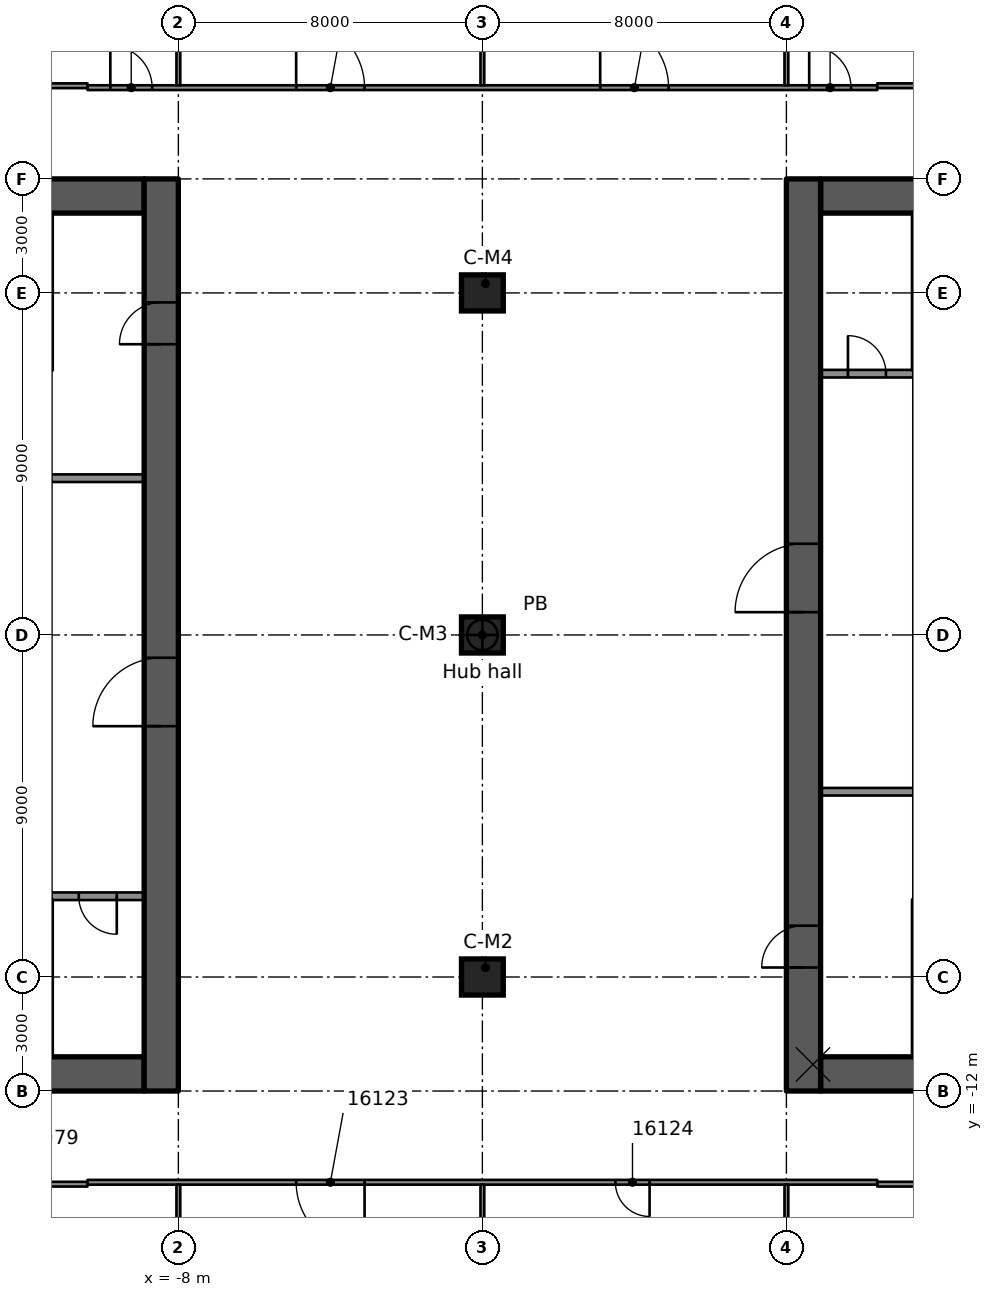
"""IFC4 building model, lengths in metres.
Left out: names, types, materials, properties, quantities, classifications, styles, units other than length and angle.
Written with IfcOpenShell. Run it as: python <this file> out.ifc"""

import sys

from ifc_helpers import new_model, si_unit, direction, frame, frame_2d, origin, origin_2d, place, context, subcontext, project, spatial, rectangle, extrude, element, fill, save


model = new_model("IFC4")
c1 = context("Model", 3, precision=1e-05, world=origin(), true_north=direction((0.0, 1.0)))
c2 = subcontext(c1, "Body", "Model", "MODEL_VIEW")
j1 = project(units=[si_unit("LENGTHUNIT", "METRE"), si_unit("PLANEANGLEUNIT", "RADIAN")], contexts=[c1])
p1 = place(None, origin())
s1 = spatial("IfcSite", under=j1, at=p1, CompositionType="ELEMENT")
p2 = place(p1, origin())
s2 = spatial("IfcBuilding", under=s1, at=p2, CompositionType="ELEMENT")
p3 = place(p2, frame((0.0, 0.0, 80.7)))
s3 = spatial("IfcBuildingStorey", under=s2, at=p3, CompositionType="ELEMENT", Elevation=80.7)
p4 = place(p3, frame((-18.1, 11.55, 0.0), z_axis=(0.0, 0.0, 1.0), x_axis=(1.0, 0.0, 0.0)))
e1 = element("IfcWall", 1, at=p4, inside=s3, PredefinedType="SHEAR", context=c2, shape_type="SweptSolid", body=[
    extrude(rectangle(XDim=9.2, YDim=0.9, at=frame_2d((4.6, 0.0))), origin(), (0.0, 0.0, 1.0), 3.5),
])
p5 = place(p4, frame((5.1, 0.0, 0.0)))
e2 = element("IfcOpeningElement", 2, at=p5, cuts=e1, PredefinedType="OPENING", context=c2, shape_type="SweptSolid", body=[
    extrude(rectangle(XDim=1.1, YDim=2.1, at=frame_2d((0.55, 1.05))), frame((0.0, 0.46, 0.0), z_axis=(0.0, -1.0, 0.0), x_axis=(1.0, 0.0, 0.0)), (0.0, 0.0, 1.0), 0.92),
])
p6 = place(p3, frame((-18.1, -11.55, 0.0), z_axis=(0.0, 0.0, 1.0), x_axis=(1.0, 0.0, 0.0)))
e3 = element("IfcWall", 3, at=p6, inside=s3, PredefinedType="SHEAR", context=c2, shape_type="SweptSolid", body=[
    extrude(rectangle(XDim=9.2, YDim=0.9, at=frame_2d((4.6, 0.0))), origin(), (0.0, 0.0, 1.0), 3.5),
])
p7 = place(p6, frame((5.1, 0.0, 0.0)))
e4 = element("IfcOpeningElement", 4, at=p7, cuts=e3, PredefinedType="OPENING", context=c2, shape_type="SweptSolid", body=[
    extrude(rectangle(XDim=1.1, YDim=2.1, at=frame_2d((0.55, 1.05))), frame((0.0, 0.46, 0.0), z_axis=(0.0, -1.0, 0.0), x_axis=(1.0, 0.0, 0.0)), (0.0, 0.0, 1.0), 0.92),
])
p8 = place(p3, frame((-8.45, -12.0, 0.0), z_axis=(0.0, 0.0, 1.0), x_axis=(0.0, 1.0, 0.0)))
e5 = element("IfcWall", 5, at=p8, inside=s3, PredefinedType="SHEAR", context=c2, shape_type="SweptSolid", body=[
    extrude(rectangle(XDim=24.0, YDim=0.9, at=frame_2d((12.0, 0.0))), origin(), (0.0, 0.0, 1.0), 3.5),
])
p9 = place(p8, frame((9.6, 0.0, 0.0)))
e6 = element("IfcOpeningElement", 6, at=p9, cuts=e5, PredefinedType="OPENING", context=c2, shape_type="SweptSolid", body=[
    extrude(rectangle(XDim=1.8, YDim=2.1, at=frame_2d((0.9, 1.05))), frame((0.0, 0.46, 0.0), z_axis=(0.0, -1.0, 0.0), x_axis=(1.0, 0.0, 0.0)), (0.0, 0.0, 1.0), 0.92),
])
p10 = place(p8, frame((19.65, 0.0, 0.0)))
e7 = element("IfcOpeningElement", 7, at=p10, cuts=e5, PredefinedType="OPENING", context=c2, shape_type="SweptSolid", body=[
    extrude(rectangle(XDim=1.1, YDim=2.1, at=frame_2d((0.55, 1.05))), frame((0.0, 0.46, 0.0), z_axis=(0.0, -1.0, 0.0), x_axis=(1.0, 0.0, 0.0)), (0.0, 0.0, 1.0), 0.92),
])
p11 = place(p3, frame((8.9, 11.55, 0.0), z_axis=(0.0, 0.0, 1.0), x_axis=(1.0, 0.0, 0.0)))
e8 = element("IfcWall", 8, at=p11, inside=s3, PredefinedType="SHEAR", context=c2, shape_type="SweptSolid", body=[
    extrude(rectangle(XDim=9.2, YDim=0.9, at=frame_2d((4.6, 0.0))), origin(), (0.0, 0.0, 1.0), 3.5),
])
p12 = place(p11, frame((3.0, 0.0, 0.0)))
e9 = element("IfcOpeningElement", 9, at=p12, cuts=e8, PredefinedType="OPENING", context=c2, shape_type="SweptSolid", body=[
    extrude(rectangle(XDim=1.1, YDim=2.1, at=frame_2d((0.55, 1.05))), frame((0.0, 0.46, 0.0), z_axis=(0.0, -1.0, 0.0), x_axis=(1.0, 0.0, 0.0)), (0.0, 0.0, 1.0), 0.92),
])
p13 = place(p3, frame((8.9, -11.55, 0.0), z_axis=(0.0, 0.0, 1.0), x_axis=(1.0, 0.0, 0.0)))
e10 = element("IfcWall", 10, at=p13, inside=s3, PredefinedType="SHEAR", context=c2, shape_type="SweptSolid", body=[
    extrude(rectangle(XDim=9.2, YDim=0.9, at=frame_2d((4.6, 0.0))), origin(), (0.0, 0.0, 1.0), 3.5),
])
p14 = place(p13, frame((3.0, 0.0, 0.0)))
e11 = element("IfcOpeningElement", 11, at=p14, cuts=e10, PredefinedType="OPENING", context=c2, shape_type="SweptSolid", body=[
    extrude(rectangle(XDim=1.1, YDim=2.1, at=frame_2d((0.55, 1.05))), frame((0.0, 0.46, 0.0), z_axis=(0.0, -1.0, 0.0), x_axis=(1.0, 0.0, 0.0)), (0.0, 0.0, 1.0), 0.92),
])
p15 = place(p3, frame((8.45, -12.0, 0.0), z_axis=(0.0, 0.0, 1.0), x_axis=(0.0, 1.0, 0.0)))
e12 = element("IfcWall", 12, at=p15, inside=s3, PredefinedType="SHEAR", context=c2, shape_type="SweptSolid", body=[
    extrude(rectangle(XDim=24.0, YDim=0.9, at=frame_2d((12.0, 0.0))), origin(), (0.0, 0.0, 1.0), 3.5),
])
p16 = place(p15, frame((12.6, 0.0, 0.0)))
e13 = element("IfcOpeningElement", 13, at=p16, cuts=e12, PredefinedType="OPENING", context=c2, shape_type="SweptSolid", body=[
    extrude(rectangle(XDim=1.8, YDim=2.1, at=frame_2d((0.9, 1.05))), frame((0.0, 0.46, 0.0), z_axis=(0.0, -1.0, 0.0), x_axis=(1.0, 0.0, 0.0)), (0.0, 0.0, 1.0), 0.92),
])
p17 = place(p15, frame((3.25, 0.0, 0.0)))
e14 = element("IfcOpeningElement", 14, at=p17, cuts=e12, PredefinedType="OPENING", context=c2, shape_type="SweptSolid", body=[
    extrude(rectangle(XDim=1.1, YDim=2.1, at=frame_2d((0.55, 1.05))), frame((0.0, 0.46, 0.0), z_axis=(0.0, -1.0, 0.0), x_axis=(1.0, 0.0, 0.0)), (0.0, 0.0, 1.0), 0.92),
])
for number, where, z_axis, x_axis in (
    (15, (0.0, -9.0, 0.0), (0.0, 0.0, 1.0), (1.0, 0.0, 0.0)),
    (16, (0.0, 0.0, 0.0), (0.0, 0.0, 1.0), (1.0, 0.0, 0.0)),
    (17, (0.0, 9.0, 0.0), (0.0, 0.0, 1.0), (1.0, 0.0, 0.0)),
):
    element("IfcColumn", number, at=place(p3, frame(where, z_axis=z_axis, x_axis=x_axis)), inside=s3, PredefinedType="COLUMN", context=c2, shape_type="SweptSolid", body=[
        extrude(rectangle(XDim=1.1, YDim=0.95, at=origin_2d()), origin(), (0.0, 0.0, 1.0), 3.5),
    ])
p18 = place(p3, frame((-8.9, 4.125, 0.0), z_axis=(0.0, 0.0, 1.0), x_axis=(-1.0, 0.0, 0.0)))
e18 = element("IfcWall", 18, at=p18, inside=s3, PredefinedType="PARTITIONING", context=c2, shape_type="SweptSolid", body=[
    extrude(rectangle(XDim=2.44, YDim=0.2, at=frame_2d((1.22, 0.0))), origin(), (0.0, 0.0, 1.0), 3.09),
])
p19 = place(p3, frame((-8.9, -6.875, 0.0), z_axis=(0.0, 0.0, 1.0), x_axis=(-1.0, 0.0, 0.0)))
e19 = element("IfcWall", 19, at=p19, inside=s3, PredefinedType="PARTITIONING", context=c2, shape_type="SweptSolid", body=[
    extrude(rectangle(XDim=2.44, YDim=0.2, at=frame_2d((1.22, 0.0))), origin(), (0.0, 0.0, 1.0), 3.09),
])
p20 = place(p19, frame((0.72, 0.0, 0.0)))
e20 = element("IfcOpeningElement", 20, at=p20, cuts=e19, PredefinedType="OPENING", context=c2, shape_type="SweptSolid", body=[
    extrude(rectangle(XDim=1.0, YDim=2.1, at=frame_2d((0.5, 1.05))), frame((0.0, 0.11, 0.0), z_axis=(0.0, -1.0, 0.0), x_axis=(1.0, 0.0, 0.0)), (0.0, 0.0, 1.0), 0.22),
])
p21 = place(p3, frame((8.9, -4.125, 0.0), z_axis=(0.0, 0.0, 1.0), x_axis=(1.0, 0.0, 0.0)))
e21 = element("IfcWall", 21, at=p21, inside=s3, PredefinedType="PARTITIONING", context=c2, shape_type="SweptSolid", body=[
    extrude(rectangle(XDim=2.44, YDim=0.2, at=frame_2d((1.22, 0.0))), origin(), (0.0, 0.0, 1.0), 3.09),
])
p22 = place(p3, frame((8.9, 6.875, 0.0), z_axis=(0.0, 0.0, 1.0), x_axis=(1.0, 0.0, 0.0)))
e22 = element("IfcWall", 22, at=p22, inside=s3, PredefinedType="PARTITIONING", context=c2, shape_type="SweptSolid", body=[
    extrude(rectangle(XDim=2.44, YDim=0.2, at=frame_2d((1.22, 0.0))), origin(), (0.0, 0.0, 1.0), 3.09),
])
p23 = place(p22, frame((0.72, 0.0, 0.0)))
e23 = element("IfcOpeningElement", 23, at=p23, cuts=e22, PredefinedType="OPENING", context=c2, shape_type="SweptSolid", body=[
    extrude(rectangle(XDim=1.0, YDim=2.1, at=frame_2d((0.5, 1.05))), frame((0.0, 0.11, 0.0), z_axis=(0.0, -1.0, 0.0), x_axis=(1.0, 0.0, 0.0)), (0.0, 0.0, 1.0), 0.22),
])
p24 = place(p3, frame((-11.543, -14.513, 0.0), z_axis=(0.0, 0.0, 1.0), x_axis=(0.055968733348, -0.99843252195, 0.0)))
e24 = element("IfcWall", 24, at=p24, inside=s3, PredefinedType="PARTITIONING", context=c2, shape_type="SweptSolid", body=[
    extrude(rectangle(XDim=3.145, YDim=0.125, at=frame_2d((1.573, 0.0))), origin(), (0.0, 0.0, 1.0), 3.08),
])
p25 = place(p24, frame((1.038, 0.0, 0.0)))
e25 = element("IfcOpeningElement", 25, at=p25, cuts=e24, PredefinedType="OPENING", context=c2, shape_type="SweptSolid", body=[
    extrude(rectangle(XDim=0.9, YDim=2.1, at=frame_2d((0.45, 1.05))), frame((0.0, 0.073, 0.0), z_axis=(0.0, -1.0, 0.0), x_axis=(1.0, 0.0, 0.0)), (0.0, 0.0, 1.0), 0.145),
])
p26 = place(p3, frame((-11.546, -14.451, 0.0), z_axis=(0.0, 0.0, 1.0), x_axis=(1.0, 0.0, 0.0)))
e26 = element("IfcWall", 26, at=p26, inside=s3, PredefinedType="PARTITIONING", context=c2, shape_type="SweptSolid", body=[
    extrude(rectangle(XDim=1.155, YDim=0.125, at=frame_2d((0.577, 0.0))), origin(), (0.0, 0.0, 1.0), 3.08),
])
p27 = place(p3, frame((21.378, -14.451, 0.0), z_axis=(0.0, 0.0, 1.0), x_axis=(-1.0, 0.0, 0.0)))
e27 = element("IfcWall", 27, at=p27, inside=s3, PredefinedType="PARTITIONING", context=c2, shape_type="SweptSolid", body=[
    extrude(rectangle(XDim=10.987, YDim=0.125, at=frame_2d((5.493, 0.0))), origin(), (0.0, 0.0, 1.0), 3.08),
])
p28 = place(p27, frame((7.811, 0.0, 0.0)))
e28 = element("IfcOpeningElement", 28, at=p28, cuts=e27, PredefinedType="OPENING", context=c2, shape_type="SweptSolid", body=[
    extrude(rectangle(XDim=0.9, YDim=2.1, at=frame_2d((0.45, 1.05))), frame((0.0, 0.073, 0.0), z_axis=(0.0, -1.0, 0.0), x_axis=(1.0, 0.0, 0.0)), (0.0, 0.0, 1.0), 0.145),
])
p29 = place(p27, frame((2.288, 0.0, 0.0)))
e29 = element("IfcOpeningElement", 29, at=p29, cuts=e27, PredefinedType="OPENING", context=c2, shape_type="SweptSolid", body=[
    extrude(rectangle(XDim=0.9, YDim=2.1, at=frame_2d((0.45, 1.05))), frame((0.0, 0.073, 0.0), z_axis=(0.0, -1.0, 0.0), x_axis=(1.0, 0.0, 0.0)), (0.0, 0.0, 1.0), 0.145),
])
p30 = place(p3, frame((10.391, -14.401, 0.0), z_axis=(0.0, 0.0, 1.0), x_axis=(-1.0, 0.0, 0.0)))
e30 = element("IfcWall", 30, at=p30, inside=s3, PredefinedType="PARTITIONING", context=c2, shape_type="SweptSolid", body=[
    extrude(rectangle(XDim=20.781, YDim=0.125, at=frame_2d((10.391, 0.0))), origin(), (0.0, 0.0, 1.0), 3.08),
])
p31 = place(p30, frame((13.491, 0.0, 0.0)))
e31 = element("IfcOpeningElement", 31, at=p31, cuts=e30, PredefinedType="OPENING", context=c2, shape_type="SweptSolid", body=[
    extrude(rectangle(XDim=1.8, YDim=2.1, at=frame_2d((0.9, 1.05))), frame((0.0, 0.073, 0.0), z_axis=(0.0, -1.0, 0.0), x_axis=(1.0, 0.0, 0.0)), (0.0, 0.0, 1.0), 0.145),
])
p32 = place(p30, frame((5.991, 0.0, 0.0)))
e32 = element("IfcOpeningElement", 32, at=p32, cuts=e30, PredefinedType="OPENING", context=c2, shape_type="SweptSolid", body=[
    extrude(rectangle(XDim=0.9, YDim=2.1, at=frame_2d((0.45, 1.05))), frame((0.0, 0.073, 0.0), z_axis=(0.0, -1.0, 0.0), x_axis=(1.0, 0.0, 0.0)), (0.0, 0.0, 1.0), 0.145),
])
p33 = place(p3, frame((-10.39, 14.401, 0.0), z_axis=(0.0, 0.0, 1.0), x_axis=(1.0, 0.0, 0.0)))
e33 = element("IfcWall", 33, at=p33, inside=s3, PredefinedType="PARTITIONING", context=c2, shape_type="SweptSolid", body=[
    extrude(rectangle(XDim=20.781, YDim=0.125, at=frame_2d((10.391, 0.0))), origin(), (0.0, 0.0, 1.0), 3.08),
])
p34 = place(p33, frame((18.99, 0.0, 0.0)))
e34 = element("IfcOpeningElement", 34, at=p34, cuts=e33, PredefinedType="OPENING", context=c2, shape_type="SweptSolid", body=[
    extrude(rectangle(XDim=1.1, YDim=2.1, at=frame_2d((0.55, 1.05))), frame((0.0, 0.073, 0.0), z_axis=(0.0, -1.0, 0.0), x_axis=(1.0, 0.0, 0.0)), (0.0, 0.0, 1.0), 0.145),
])
p35 = place(p33, frame((13.49, 0.0, 0.0)))
e35 = element("IfcOpeningElement", 35, at=p35, cuts=e33, PredefinedType="OPENING", context=c2, shape_type="SweptSolid", body=[
    extrude(rectangle(XDim=1.8, YDim=2.1, at=frame_2d((0.9, 1.05))), frame((0.0, 0.073, 0.0), z_axis=(0.0, -1.0, 0.0), x_axis=(1.0, 0.0, 0.0)), (0.0, 0.0, 1.0), 0.145),
])
p36 = place(p33, frame((5.49, 0.0, 0.0)))
e36 = element("IfcOpeningElement", 36, at=p36, cuts=e33, PredefinedType="OPENING", context=c2, shape_type="SweptSolid", body=[
    extrude(rectangle(XDim=1.8, YDim=2.1, at=frame_2d((0.9, 1.05))), frame((0.0, 0.073, 0.0), z_axis=(0.0, -1.0, 0.0), x_axis=(1.0, 0.0, 0.0)), (0.0, 0.0, 1.0), 0.145),
])
p37 = place(p33, frame((0.6, 0.0, 0.0)))
e37 = element("IfcOpeningElement", 37, at=p37, cuts=e33, PredefinedType="OPENING", context=c2, shape_type="SweptSolid", body=[
    extrude(rectangle(XDim=1.1, YDim=2.1, at=frame_2d((0.55, 1.05))), frame((0.0, 0.073, 0.0), z_axis=(0.0, -1.0, 0.0), x_axis=(1.0, 0.0, 0.0)), (0.0, 0.0, 1.0), 0.145),
])
p38 = place(p3, frame((-21.387, 14.451, 0.0), z_axis=(0.0, 0.0, 1.0), x_axis=(1.0, 0.0, 0.0)))
e38 = element("IfcWall", 38, at=p38, inside=s3, PredefinedType="PARTITIONING", context=c2, shape_type="SweptSolid", body=[
    extrude(rectangle(XDim=10.996, YDim=0.125, at=frame_2d((5.498, 0.0))), origin(), (0.0, 0.0, 1.0), 3.08),
])
p39 = place(p38, frame((2.288, 0.0, 0.0)))
e39 = element("IfcOpeningElement", 39, at=p39, cuts=e38, PredefinedType="OPENING", context=c2, shape_type="SweptSolid", body=[
    extrude(rectangle(XDim=0.9, YDim=2.1, at=frame_2d((0.45, 1.05))), frame((0.0, 0.073, 0.0), z_axis=(0.0, -1.0, 0.0), x_axis=(1.0, 0.0, 0.0)), (0.0, 0.0, 1.0), 0.145),
])
p40 = place(p3, frame((10.391, 14.451, 0.0), z_axis=(0.0, 0.0, 1.0), x_axis=(1.0, 0.0, 0.0)))
e40 = element("IfcWall", 40, at=p40, inside=s3, PredefinedType="PARTITIONING", context=c2, shape_type="SweptSolid", body=[
    extrude(rectangle(XDim=10.996, YDim=0.125, at=frame_2d((5.498, 0.0))), origin(), (0.0, 0.0, 1.0), 3.08),
])
p41 = place(p3, frame((8.0, -29.186, 0.0), z_axis=(0.0, 0.0, 1.0), x_axis=(0.0, 1.0, 0.0)))
e41 = element("IfcWall", 41, at=p41, inside=s3, PredefinedType="PARTITIONING", context=c2, shape_type="SweptSolid", body=[
    extrude(rectangle(XDim=14.723, YDim=0.1, at=frame_2d((7.362, 0.0))), origin(), (0.0, 0.0, 1.0), 3.08),
])
p42 = place(p3, frame((8.0, 14.463, 0.0), z_axis=(0.0, 0.0, 1.0), x_axis=(0.0, 1.0, 0.0)))
e42 = element("IfcWall", 42, at=p42, inside=s3, PredefinedType="PARTITIONING", context=c2, shape_type="SweptSolid", body=[
    extrude(rectangle(XDim=15.543, YDim=0.1, at=frame_2d((7.771, 0.0))), origin(), (0.0, 0.0, 1.0), 3.08),
])
p43 = place(p3, frame((0.0, -34.871, 0.0), z_axis=(0.0, 0.0, 1.0), x_axis=(0.0, 1.0, 0.0)))
e43 = element("IfcWall", 43, at=p43, inside=s3, PredefinedType="PARTITIONING", context=c2, shape_type="SweptSolid", body=[
    extrude(rectangle(XDim=20.408, YDim=0.1, at=frame_2d((10.204, 0.0))), origin(), (0.0, 0.0, 1.0), 3.08),
])
p44 = place(p3, frame((0.0, 14.463, 0.0), z_axis=(0.0, 0.0, 1.0), x_axis=(0.0, 1.0, 0.0)))
e44 = element("IfcWall", 44, at=p44, inside=s3, PredefinedType="PARTITIONING", context=c2, shape_type="SweptSolid", body=[
    extrude(rectangle(XDim=17.169, YDim=0.1, at=frame_2d((8.584, 0.0))), origin(), (0.0, 0.0, 1.0), 3.08),
])
p45 = place(p3, frame((-8.0, -33.126, 0.0), z_axis=(0.0, 0.0, 1.0), x_axis=(0.0, 1.0, 0.0)))
e45 = element("IfcWall", 45, at=p45, inside=s3, PredefinedType="PARTITIONING", context=c2, shape_type="SweptSolid", body=[
    extrude(rectangle(XDim=18.663, YDim=0.1, at=frame_2d((9.332, 0.0))), origin(), (0.0, 0.0, 1.0), 3.08),
])
p46 = place(p3, frame((-8.0, 14.463, 0.0), z_axis=(0.0, 0.0, 1.0), x_axis=(0.0, 1.0, 0.0)))
e46 = element("IfcWall", 46, at=p46, inside=s3, PredefinedType="PARTITIONING", context=c2, shape_type="SweptSolid", body=[
    extrude(rectangle(XDim=14.723, YDim=0.1, at=frame_2d((7.362, 0.0))), origin(), (0.0, 0.0, 1.0), 3.08),
])
p47 = place(p9, origin())
e47 = element("IfcDoor", 47, at=p47, inside=s3, OperationType="SINGLE_SWING_LEFT", PredefinedType="DOOR", context=c2, shape_type="SweptSolid", body=[
    extrude(rectangle(XDim=1.8, YDim=2.1, at=frame_2d((0.9, 1.05))), frame((0.0, 0.025, 0.0), z_axis=(0.0, -1.0, 0.0), x_axis=(1.0, 0.0, 0.0)), (0.0, 0.0, 1.0), 0.05),
])
fill(e6, e47)
p48 = place(p10, origin())
e48 = element("IfcDoor", 48, at=p48, inside=s3, OperationType="SINGLE_SWING_RIGHT", PredefinedType="DOOR", context=c2, shape_type="SweptSolid", body=[
    extrude(rectangle(XDim=1.1, YDim=2.1, at=frame_2d((0.55, 1.05))), frame((0.0, 0.025, 0.0), z_axis=(0.0, -1.0, 0.0), x_axis=(1.0, 0.0, 0.0)), (0.0, 0.0, 1.0), 0.05),
])
fill(e7, e48)
p49 = place(p20, origin())
e49 = element("IfcDoor", 49, at=p49, inside=s3, OperationType="SINGLE_SWING_RIGHT", PredefinedType="DOOR", context=c2, shape_type="SweptSolid", body=[
    extrude(rectangle(XDim=1.0, YDim=2.1, at=frame_2d((0.5, 1.05))), frame((0.0, 0.025, 0.0), z_axis=(0.0, -1.0, 0.0), x_axis=(1.0, 0.0, 0.0)), (0.0, 0.0, 1.0), 0.05),
])
fill(e20, e49)
p50 = place(p16, origin())
e50 = element("IfcDoor", 50, at=p50, inside=s3, OperationType="SINGLE_SWING_RIGHT", PredefinedType="DOOR", context=c2, shape_type="SweptSolid", body=[
    extrude(rectangle(XDim=1.8, YDim=2.1, at=frame_2d((0.9, 1.05))), frame((0.0, 0.025, 0.0), z_axis=(0.0, -1.0, 0.0), x_axis=(1.0, 0.0, 0.0)), (0.0, 0.0, 1.0), 0.05),
])
fill(e13, e50)
p51 = place(p17, origin())
e51 = element("IfcDoor", 51, at=p51, inside=s3, OperationType="SINGLE_SWING_LEFT", PredefinedType="DOOR", context=c2, shape_type="SweptSolid", body=[
    extrude(rectangle(XDim=1.1, YDim=2.1, at=frame_2d((0.55, 1.05))), frame((0.0, 0.025, 0.0), z_axis=(0.0, -1.0, 0.0), x_axis=(1.0, 0.0, 0.0)), (0.0, 0.0, 1.0), 0.05),
])
fill(e14, e51)
p52 = place(p23, origin())
e52 = element("IfcDoor", 52, at=p52, inside=s3, OperationType="SINGLE_SWING_RIGHT", PredefinedType="DOOR", context=c2, shape_type="SweptSolid", body=[
    extrude(rectangle(XDim=1.0, YDim=2.1, at=frame_2d((0.5, 1.05))), frame((0.0, 0.025, 0.0), z_axis=(0.0, -1.0, 0.0), x_axis=(1.0, 0.0, 0.0)), (0.0, 0.0, 1.0), 0.05),
])
fill(e23, e52)
p53 = place(p31, origin())
e53 = element("IfcDoor", 53, at=p53, inside=s3, OperationType="DOUBLE_DOOR_SINGLE_SWING", PredefinedType="DOOR", context=c2, shape_type="SweptSolid", body=[
    extrude(rectangle(XDim=1.8, YDim=2.1, at=frame_2d((0.9, 1.05))), frame((0.0, 0.025, 0.0), z_axis=(0.0, -1.0, 0.0), x_axis=(1.0, 0.0, 0.0)), (0.0, 0.0, 1.0), 0.05),
])
fill(e31, e53)
p54 = place(p32, origin())
e54 = element("IfcDoor", 54, at=p54, inside=s3, OperationType="SINGLE_SWING_LEFT", PredefinedType="DOOR", context=c2, shape_type="SweptSolid", body=[
    extrude(rectangle(XDim=0.9, YDim=2.1, at=frame_2d((0.45, 1.05))), frame((0.0, 0.025, 0.0), z_axis=(0.0, -1.0, 0.0), x_axis=(1.0, 0.0, 0.0)), (0.0, 0.0, 1.0), 0.05),
])
fill(e32, e54)
p55 = place(p34, origin())
e55 = element("IfcDoor", 55, at=p55, inside=s3, OperationType="SINGLE_SWING_RIGHT", PredefinedType="DOOR", context=c2, shape_type="SweptSolid", body=[
    extrude(rectangle(XDim=1.1, YDim=2.1, at=frame_2d((0.55, 1.05))), frame((0.0, 0.025, 0.0), z_axis=(0.0, -1.0, 0.0), x_axis=(1.0, 0.0, 0.0)), (0.0, 0.0, 1.0), 0.05),
])
fill(e34, e55)
p56 = place(p35, origin())
e56 = element("IfcDoor", 56, at=p56, inside=s3, OperationType="DOUBLE_DOOR_SINGLE_SWING", PredefinedType="DOOR", context=c2, shape_type="SweptSolid", body=[
    extrude(rectangle(XDim=1.8, YDim=2.1, at=frame_2d((0.9, 1.05))), frame((0.0, 0.025, 0.0), z_axis=(0.0, -1.0, 0.0), x_axis=(1.0, 0.0, 0.0)), (0.0, 0.0, 1.0), 0.05),
])
fill(e35, e56)
p57 = place(p36, origin())
e57 = element("IfcDoor", 57, at=p57, inside=s3, OperationType="DOUBLE_DOOR_SINGLE_SWING", PredefinedType="DOOR", context=c2, shape_type="SweptSolid", body=[
    extrude(rectangle(XDim=1.8, YDim=2.1, at=frame_2d((0.9, 1.05))), frame((0.0, 0.025, 0.0), z_axis=(0.0, -1.0, 0.0), x_axis=(1.0, 0.0, 0.0)), (0.0, 0.0, 1.0), 0.05),
])
fill(e36, e57)
p58 = place(p37, origin())
e58 = element("IfcDoor", 58, at=p58, inside=s3, OperationType="SINGLE_SWING_LEFT", PredefinedType="DOOR", context=c2, shape_type="SweptSolid", body=[
    extrude(rectangle(XDim=1.1, YDim=2.1, at=frame_2d((0.55, 1.05))), frame((0.0, 0.025, 0.0), z_axis=(0.0, -1.0, 0.0), x_axis=(1.0, 0.0, 0.0)), (0.0, 0.0, 1.0), 0.05),
])
fill(e37, e58)
save(model, sys.argv[1])
